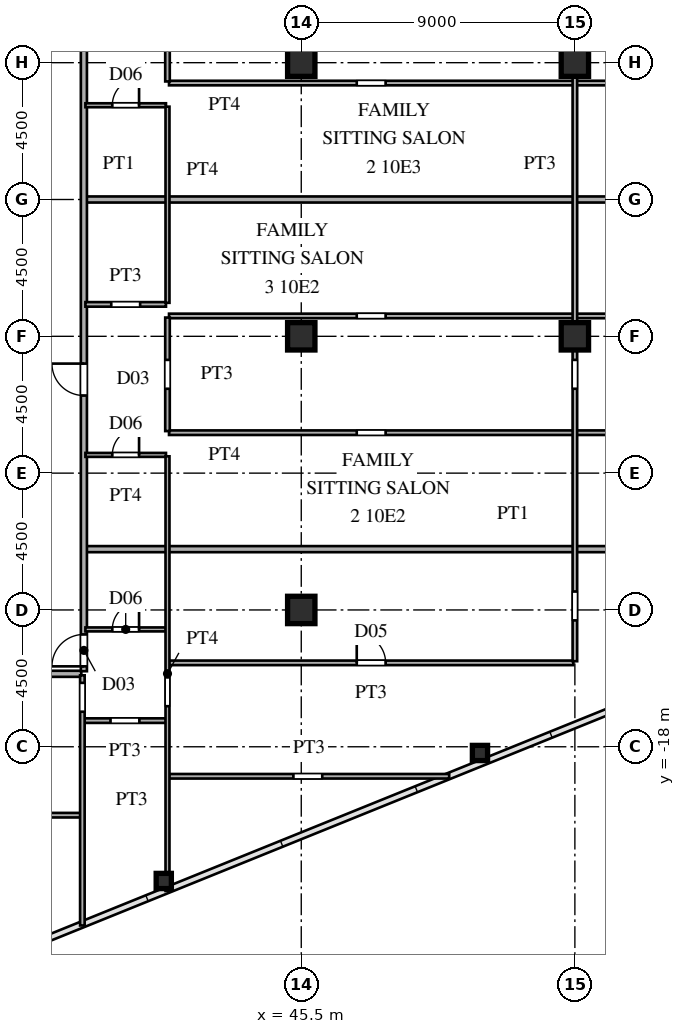
"""IFC4 building model, lengths in metres.
Left out: names, types, materials, properties, quantities, classifications, styles, units other than length and angle.
Written with IfcOpenShell. Run it as: python <this file> out.ifc"""

import sys

from ifc_helpers import new_model, si_unit, direction, frame, frame_2d, origin, origin_2d, place, context, subcontext, project, spatial, rectangle, hollow_rectangle, i_section, extrude, source, transform, mapped, element, fill, save


model = new_model("IFC4")
c1 = context("Model", 3, precision=1e-05, world=origin(), true_north=direction((0.0, 1.0)))
c2 = subcontext(c1, "Body", "Model", "MODEL_VIEW")
j1 = project(units=[si_unit("LENGTHUNIT", "METRE"), si_unit("PLANEANGLEUNIT", "RADIAN")], contexts=[c1])
p1 = place(None, origin())
s1 = spatial("IfcSite", under=j1, at=p1, CompositionType="ELEMENT")
p2 = place(p1, origin())
s2 = spatial("IfcBuilding", under=s1, at=p2, CompositionType="ELEMENT")
p3 = place(p2, frame((0.0, 0.0, 40.5)))
s3 = spatial("IfcBuildingStorey", under=s2, at=p3, CompositionType="ELEMENT", Elevation=40.5)
m1 = source(origin(), c2, "Body", "SweptSolid", [
    extrude(i_section(OverallWidth=0.9, OverallDepth=0.9, WebThickness=0.036, FlangeThickness=0.055, at=origin_2d()), origin(), (0.0, 0.0, 1.0), 3.6),
])
for number, where, z_axis, x_axis in (
    (1, (45.5, -13.5, 0.0), (0.0, 0.0, 1.0), (1.0, 0.0, 0.0)),
    (2, (45.5, -4.5, 0.0), (0.0, 0.0, 1.0), (1.0, 0.0, 0.0)),
    (3, (45.5, 4.5, 0.0), (0.0, 0.0, 1.0), (1.0, 0.0, 0.0)),
    (4, (54.5, -4.5, 0.0), (0.0, 0.0, 1.0), (1.0, 0.0, 0.0)),
    (5, (54.5, 4.5, 0.0), (0.0, 0.0, 1.0), (1.0, 0.0, 0.0)),
):
    element("IfcColumn", number, at=place(p3, frame(where, z_axis=z_axis, x_axis=x_axis)), inside=s3, PredefinedType="COLUMN", context=c2, shape_type="MappedRepresentation", body=[
        mapped(m1, transform((0.0, 0.0, 0.0), scale=1.0)),
    ])
m2 = source(origin(), c2, "Body", "SweptSolid", [
    extrude(hollow_rectangle(XDim=0.5, YDim=0.5, WallThickness=0.02, at=origin_2d()), origin(), (0.0, 0.0, 1.0), 3.6),
])
for number, where, z_axis, x_axis in (
    (6, (40.977, -22.414, 0.0), (0.0, 0.0, 1.0), (1.0, 0.0, 0.0)),
    (7, (51.378, -18.204, 0.0), (0.0, 0.0, 1.0), (1.0, 0.0, 0.0)),
):
    element("IfcColumn", number, at=place(p3, frame(where, z_axis=z_axis, x_axis=x_axis)), inside=s3, PredefinedType="COLUMN", context=c2, shape_type="MappedRepresentation", body=[
        mapped(m2, transform((0.0, 0.0, 0.0), scale=1.0)),
    ])
p4 = place(p3, frame((27.465, -20.25, 0.0), z_axis=(0.0, 0.0, 1.0), x_axis=(1.0, 0.0, 0.0)))
e8 = element("IfcWall", 8, at=p4, inside=s3, PredefinedType="PARTITIONING", context=c2, shape_type="SweptSolid", body=[
    extrude(rectangle(XDim=10.785, YDim=0.15, at=frame_2d((5.393, 0.0))), origin(), (0.0, 0.0, 1.0), 3.38),
])
p5 = place(p4, frame((4.96, 0.0, 0.0)))
e9 = element("IfcOpeningElement", 9, at=p5, cuts=e8, PredefinedType="OPENING", context=c2, shape_type="SweptSolid", body=[
    extrude(rectangle(XDim=0.95, YDim=2.15, at=frame_2d((0.475, 1.075))), frame((0.0, 0.085, 0.0), z_axis=(0.0, -1.0, 0.0), x_axis=(1.0, 0.0, 0.0)), (0.0, 0.0, 1.0), 0.17),
])
p6 = place(p3, frame((41.15, -18.97, 0.0), z_axis=(0.0, 0.0, 1.0), x_axis=(1.0, 0.0, 0.0)))
e10 = element("IfcWall", 10, at=p6, inside=s3, PredefinedType="PARTITIONING", context=c2, shape_type="SweptSolid", body=[
    extrude(rectangle(XDim=9.216, YDim=0.15, at=frame_2d((4.608, 0.0))), origin(), (0.0, 0.0, 1.0), 3.38),
])
p7 = place(p6, frame((4.091, 0.0, 0.0)))
e11 = element("IfcOpeningElement", 11, at=p7, cuts=e10, PredefinedType="OPENING", context=c2, shape_type="SweptSolid", body=[
    extrude(rectangle(XDim=0.95, YDim=2.15, at=frame_2d((0.475, 1.075))), frame((0.0, 0.085, 0.0), z_axis=(0.0, -1.0, 0.0), x_axis=(1.0, 0.0, 0.0)), (0.0, 0.0, 1.0), 0.17),
])
p8 = place(p3, frame((38.35, -17.14, 0.0), z_axis=(0.0, 0.0, 1.0), x_axis=(1.0, 0.0, 0.0)))
e12 = element("IfcWall", 12, at=p8, inside=s3, PredefinedType="PARTITIONING", context=c2, shape_type="SweptSolid", body=[
    extrude(rectangle(XDim=2.7, YDim=0.15, at=frame_2d((1.35, 0.0))), origin(), (0.0, 0.0, 1.0), 3.38),
])
p9 = place(p8, frame((0.875, 0.0, 0.0)))
e13 = element("IfcOpeningElement", 13, at=p9, cuts=e12, PredefinedType="OPENING", context=c2, shape_type="SweptSolid", body=[
    extrude(rectangle(XDim=0.95, YDim=2.15, at=frame_2d((0.475, 1.075))), frame((0.0, 0.085, 0.0), z_axis=(0.0, -1.0, 0.0), x_axis=(1.0, 0.0, 0.0)), (0.0, 0.0, 1.0), 0.17),
])
p10 = place(p3, frame((36.585, -15.6, 0.0), z_axis=(0.0, 0.0, 1.0), x_axis=(1.0, 0.0, 0.0)))
e14 = element("IfcWall", 14, at=p10, inside=s3, PredefinedType="PARTITIONING", context=c2, shape_type="SweptSolid", body=[
    extrude(rectangle(XDim=1.68, YDim=0.2, at=frame_2d((0.84, 0.0))), origin(), (0.0, 0.0, 1.0), 3.38),
])
p11 = place(p3, frame((41.15, -15.24, 0.0), z_axis=(0.0, 0.0, 1.0), x_axis=(1.0, 0.0, 0.0)))
e15 = element("IfcWall", 15, at=p11, inside=s3, PredefinedType="PARTITIONING", context=c2, shape_type="SweptSolid", body=[
    extrude(rectangle(XDim=13.3, YDim=0.15, at=frame_2d((6.65, 0.0))), origin(), (0.0, 0.0, 1.0), 3.38),
])
p12 = place(p11, frame((6.175, 0.0, 0.0)))
e16 = element("IfcOpeningElement", 16, at=p12, cuts=e15, PredefinedType="OPENING", context=c2, shape_type="SweptSolid", body=[
    extrude(rectangle(XDim=0.95, YDim=2.15, at=frame_2d((0.475, 1.075))), frame((0.0, 0.085, 0.0), z_axis=(0.0, -1.0, 0.0), x_axis=(1.0, 0.0, 0.0)), (0.0, 0.0, 1.0), 0.17),
])
p13 = place(p3, frame((38.4, -14.14, 0.0), z_axis=(0.0, 0.0, 1.0), x_axis=(1.0, 0.0, 0.0)))
e17 = element("IfcWall", 17, at=p13, inside=s3, PredefinedType="PARTITIONING", context=c2, shape_type="SweptSolid", body=[
    extrude(rectangle(XDim=2.65, YDim=0.13, at=frame_2d((1.325, 0.0))), origin(), (0.0, 0.0, 1.0), 3.38),
])
p14 = place(p13, frame((0.885, 0.0, 0.0)))
e18 = element("IfcOpeningElement", 18, at=p14, cuts=e17, PredefinedType="OPENING", context=c2, shape_type="SweptSolid", body=[
    extrude(rectangle(XDim=0.88, YDim=2.1, at=frame_2d((0.44, 1.05))), frame((0.0, 0.075, 0.0), z_axis=(0.0, -1.0, 0.0), x_axis=(1.0, 0.0, 0.0)), (0.0, 0.0, 1.0), 0.15),
])
p15 = place(p3, frame((38.43, -11.5, 0.0), z_axis=(0.0, 0.0, 1.0), x_axis=(1.0, 0.0, 0.0)))
e19 = element("IfcWall", 19, at=p15, inside=s3, PredefinedType="PARTITIONING", context=c2, shape_type="SweptSolid", body=[
    extrude(rectangle(XDim=30.377, YDim=0.2, at=frame_2d((15.188, 0.0))), origin(), (0.0, 0.0, 1.0), 3.38),
])
p16 = place(p3, frame((38.4, -8.4, 0.0), z_axis=(0.0, 0.0, 1.0), x_axis=(1.0, 0.0, 0.0)))
e20 = element("IfcWall", 20, at=p16, inside=s3, PredefinedType="PARTITIONING", context=c2, shape_type="SweptSolid", body=[
    extrude(rectangle(XDim=2.65, YDim=0.13, at=frame_2d((1.325, 0.0))), origin(), (0.0, 0.0, 1.0), 3.38),
])
p17 = place(p16, frame((0.885, 0.0, 0.0)))
e21 = element("IfcOpeningElement", 21, at=p17, cuts=e20, PredefinedType="OPENING", context=c2, shape_type="SweptSolid", body=[
    extrude(rectangle(XDim=0.88, YDim=2.1, at=frame_2d((0.44, 1.05))), frame((0.0, 0.075, 0.0), z_axis=(0.0, -1.0, 0.0), x_axis=(1.0, 0.0, 0.0)), (0.0, 0.0, 1.0), 0.15),
])
p18 = place(p3, frame((41.15, -7.67, 0.0), z_axis=(0.0, 0.0, 1.0), x_axis=(1.0, 0.0, 0.0)))
e22 = element("IfcWall", 22, at=p18, inside=s3, PredefinedType="PARTITIONING", context=c2, shape_type="SweptSolid", body=[
    extrude(rectangle(XDim=31.385, YDim=0.15, at=frame_2d((15.692, 0.0))), origin(), (0.0, 0.0, 1.0), 3.38),
])
p19 = place(p18, frame((6.175, 0.0, 0.0)))
e23 = element("IfcOpeningElement", 23, at=p19, cuts=e22, PredefinedType="OPENING", context=c2, shape_type="SweptSolid", body=[
    extrude(rectangle(XDim=0.95, YDim=2.15, at=frame_2d((0.475, 1.075))), frame((0.0, 0.085, 0.0), z_axis=(0.0, -1.0, 0.0), x_axis=(1.0, 0.0, 0.0)), (0.0, 0.0, 1.0), 0.17),
])
p20 = place(p18, frame((15.725, 0.0, 0.0)))
e24 = element("IfcOpeningElement", 24, at=p20, cuts=e22, PredefinedType="OPENING", context=c2, shape_type="SweptSolid", body=[
    extrude(rectangle(XDim=0.95, YDim=2.15, at=frame_2d((0.475, 1.075))), frame((0.0, 0.085, 0.0), z_axis=(0.0, -1.0, 0.0), x_axis=(1.0, 0.0, 0.0)), (0.0, 0.0, 1.0), 0.17),
])
p21 = place(p3, frame((41.15, -3.83, 0.0), z_axis=(0.0, 0.0, 1.0), x_axis=(1.0, 0.0, 0.0)))
e25 = element("IfcWall", 25, at=p21, inside=s3, PredefinedType="PARTITIONING", context=c2, shape_type="SweptSolid", body=[
    extrude(rectangle(XDim=31.385, YDim=0.15, at=frame_2d((15.692, 0.0))), origin(), (0.0, 0.0, 1.0), 3.38),
])
p22 = place(p21, frame((6.175, 0.0, 0.0)))
e26 = element("IfcOpeningElement", 26, at=p22, cuts=e25, PredefinedType="OPENING", context=c2, shape_type="SweptSolid", body=[
    extrude(rectangle(XDim=0.95, YDim=2.15, at=frame_2d((0.475, 1.075))), frame((0.0, 0.085, 0.0), z_axis=(0.0, -1.0, 0.0), x_axis=(1.0, 0.0, 0.0)), (0.0, 0.0, 1.0), 0.17),
])
p23 = place(p21, frame((15.725, 0.0, 0.0)))
e27 = element("IfcOpeningElement", 27, at=p23, cuts=e25, PredefinedType="OPENING", context=c2, shape_type="SweptSolid", body=[
    extrude(rectangle(XDim=0.95, YDim=2.15, at=frame_2d((0.475, 1.075))), frame((0.0, 0.085, 0.0), z_axis=(0.0, -1.0, 0.0), x_axis=(1.0, 0.0, 0.0)), (0.0, 0.0, 1.0), 0.17),
])
p24 = place(p3, frame((38.4, -3.45, 0.0), z_axis=(0.0, 0.0, 1.0), x_axis=(1.0, 0.0, 0.0)))
e28 = element("IfcWall", 28, at=p24, inside=s3, PredefinedType="PARTITIONING", context=c2, shape_type="SweptSolid", body=[
    extrude(rectangle(XDim=2.65, YDim=0.15, at=frame_2d((1.325, 0.0))), origin(), (0.0, 0.0, 1.0), 3.38),
])
p25 = place(p24, frame((0.85, 0.0, 0.0)))
e29 = element("IfcOpeningElement", 29, at=p25, cuts=e28, PredefinedType="OPENING", context=c2, shape_type="SweptSolid", body=[
    extrude(rectangle(XDim=0.95, YDim=2.15, at=frame_2d((0.475, 1.075))), frame((0.0, 0.085, 0.0), z_axis=(0.0, -1.0, 0.0), x_axis=(1.0, 0.0, 0.0)), (0.0, 0.0, 1.0), 0.17),
])
p26 = place(p3, frame((38.43, 0.0, 0.0), z_axis=(0.0, 0.0, 1.0), x_axis=(1.0, 0.0, 0.0)))
e30 = element("IfcWall", 30, at=p26, inside=s3, PredefinedType="PARTITIONING", context=c2, shape_type="SweptSolid", body=[
    extrude(rectangle(XDim=25.05, YDim=0.2, at=frame_2d((12.525, 0.0))), origin(), (0.0, 0.0, 1.0), 3.38),
])
p27 = place(p3, frame((38.4, 3.1, 0.0), z_axis=(0.0, 0.0, 1.0), x_axis=(1.0, 0.0, 0.0)))
e31 = element("IfcWall", 31, at=p27, inside=s3, PredefinedType="PARTITIONING", context=c2, shape_type="SweptSolid", body=[
    extrude(rectangle(XDim=2.65, YDim=0.13, at=frame_2d((1.325, 0.0))), origin(), (0.0, 0.0, 1.0), 3.38),
])
p28 = place(p27, frame((0.885, 0.0, 0.0)))
e32 = element("IfcOpeningElement", 32, at=p28, cuts=e31, PredefinedType="OPENING", context=c2, shape_type="SweptSolid", body=[
    extrude(rectangle(XDim=0.88, YDim=2.1, at=frame_2d((0.44, 1.05))), frame((0.0, 0.075, 0.0), z_axis=(0.0, -1.0, 0.0), x_axis=(1.0, 0.0, 0.0)), (0.0, 0.0, 1.0), 0.15),
])
p29 = place(p3, frame((41.15, 3.83, 0.0), z_axis=(0.0, 0.0, 1.0), x_axis=(1.0, 0.0, 0.0)))
e33 = element("IfcWall", 33, at=p29, inside=s3, PredefinedType="PARTITIONING", context=c2, shape_type="SweptSolid", body=[
    extrude(rectangle(XDim=31.385, YDim=0.15, at=frame_2d((15.692, 0.0))), origin(), (0.0, 0.0, 1.0), 3.38),
])
p30 = place(p29, frame((6.175, 0.0, 0.0)))
e34 = element("IfcOpeningElement", 34, at=p30, cuts=e33, PredefinedType="OPENING", context=c2, shape_type="SweptSolid", body=[
    extrude(rectangle(XDim=0.95, YDim=2.15, at=frame_2d((0.475, 1.075))), frame((0.0, 0.085, 0.0), z_axis=(0.0, -1.0, 0.0), x_axis=(1.0, 0.0, 0.0)), (0.0, 0.0, 1.0), 0.17),
])
p31 = place(p29, frame((15.725, 0.0, 0.0)))
e35 = element("IfcOpeningElement", 35, at=p31, cuts=e33, PredefinedType="OPENING", context=c2, shape_type="SweptSolid", body=[
    extrude(rectangle(XDim=0.95, YDim=2.15, at=frame_2d((0.475, 1.075))), frame((0.0, 0.085, 0.0), z_axis=(0.0, -1.0, 0.0), x_axis=(1.0, 0.0, 0.0)), (0.0, 0.0, 1.0), 0.17),
])
p32 = place(p3, frame((38.3, -23.878, 0.0), z_axis=(0.0, 0.0, 1.0), x_axis=(0.0, 1.0, 0.0)))
e36 = element("IfcWall", 36, at=p32, inside=s3, PredefinedType="PARTITIONING", context=c2, shape_type="SweptSolid", body=[
    extrude(rectangle(XDim=8.228, YDim=0.15, at=frame_2d((4.114, 0.0))), origin(), (0.0, 0.0, 1.0), 3.38),
])
p33 = place(p32, frame((7.031, 0.0, 0.0)))
e37 = element("IfcOpeningElement", 37, at=p33, cuts=e36, PredefinedType="OPENING", context=c2, shape_type="SweptSolid", body=[
    extrude(rectangle(XDim=0.95, YDim=2.15, at=frame_2d((0.475, 1.075))), frame((0.0, 0.085, 0.0), z_axis=(0.0, -1.0, 0.0), x_axis=(1.0, 0.0, 0.0)), (0.0, 0.0, 1.0), 0.17),
])
p34 = place(p3, frame((38.35, -15.515, 0.0), z_axis=(0.0, 0.0, 1.0), x_axis=(0.0, 1.0, 0.0)))
e38 = element("IfcWall", 38, at=p34, inside=s3, PredefinedType="PARTITIONING", context=c2, shape_type="SweptSolid", body=[
    extrude(rectangle(XDim=31.03, YDim=0.2, at=frame_2d((15.515, 0.0))), origin(), (0.0, 0.0, 1.0), 3.38),
])
p35 = place(p34, frame((0.16, 0.0, 0.0)))
e39 = element("IfcOpeningElement", 39, at=p35, cuts=e38, PredefinedType="OPENING", context=c2, shape_type="SweptSolid", body=[
    extrude(rectangle(XDim=1.05, YDim=2.25, at=frame_2d((0.525, 1.125))), frame((0.0, 0.11, 0.0), z_axis=(0.0, -1.0, 0.0), x_axis=(1.0, 0.0, 0.0)), (0.0, 0.0, 1.0), 0.22),
])
p36 = place(p34, frame((9.067, 0.0, 0.0)))
e40 = element("IfcOpeningElement", 40, at=p36, cuts=e38, PredefinedType="OPENING", context=c2, shape_type="SweptSolid", body=[
    extrude(rectangle(XDim=1.05, YDim=2.25, at=frame_2d((0.525, 1.125))), frame((0.0, 0.11, 0.0), z_axis=(0.0, -1.0, 0.0), x_axis=(1.0, 0.0, 0.0)), (0.0, 0.0, 1.0), 0.22),
])
p37 = place(p34, frame((20.567, 0.0, 0.0)))
e41 = element("IfcOpeningElement", 41, at=p37, cuts=e38, PredefinedType="OPENING", context=c2, shape_type="SweptSolid", body=[
    extrude(rectangle(XDim=1.05, YDim=2.25, at=frame_2d((0.525, 1.125))), frame((0.0, 0.11, 0.0), z_axis=(0.0, -1.0, 0.0), x_axis=(1.0, 0.0, 0.0)), (0.0, 0.0, 1.0), 0.22),
])
p38 = place(p34, frame((29.82, 0.0, 0.0)))
e42 = element("IfcOpeningElement", 42, at=p38, cuts=e38, PredefinedType="OPENING", context=c2, shape_type="SweptSolid", body=[
    extrude(rectangle(XDim=1.05, YDim=2.25, at=frame_2d((0.525, 1.125))), frame((0.0, 0.11, 0.0), z_axis=(0.0, -1.0, 0.0), x_axis=(1.0, 0.0, 0.0)), (0.0, 0.0, 1.0), 0.22),
])
p39 = place(p3, frame((41.1, -22.744, 0.0), z_axis=(0.0, 0.0, 1.0), x_axis=(0.0, 1.0, 0.0)))
e43 = element("IfcWall", 43, at=p39, inside=s3, PredefinedType="PARTITIONING", context=c2, shape_type="SweptSolid", body=[
    extrude(rectangle(XDim=14.297, YDim=0.13, at=frame_2d((7.148, 0.0))), origin(), (0.0, 0.0, 1.0), 3.38),
])
p40 = place(p39, frame((6.078, 0.0, 0.0)))
e44 = element("IfcOpeningElement", 44, at=p40, cuts=e43, PredefinedType="OPENING", context=c2, shape_type="SweptSolid", body=[
    extrude(rectangle(XDim=0.95, YDim=2.15, at=frame_2d((0.475, 1.075))), frame((0.0, 0.075, 0.0), z_axis=(0.0, -1.0, 0.0), x_axis=(1.0, 0.0, 0.0)), (0.0, 0.0, 1.0), 0.15),
])
p41 = place(p3, frame((41.1, -7.617, 0.0), z_axis=(0.0, 0.0, 1.0), x_axis=(0.0, 1.0, 0.0)))
e45 = element("IfcWall", 45, at=p41, inside=s3, PredefinedType="PARTITIONING", context=c2, shape_type="SweptSolid", body=[
    extrude(rectangle(XDim=3.734, YDim=0.15, at=frame_2d((1.867, 0.0))), origin(), (0.0, 0.0, 1.0), 2.99),
])
p42 = place(p41, frame((1.392, 0.0, 0.0)))
e46 = element("IfcOpeningElement", 46, at=p42, cuts=e45, PredefinedType="OPENING", context=c2, shape_type="SweptSolid", body=[
    extrude(rectangle(XDim=0.95, YDim=2.15, at=frame_2d((0.475, 1.075))), frame((0.0, 0.085, 0.0), z_axis=(0.0, -1.0, 0.0), x_axis=(1.0, 0.0, 0.0)), (0.0, 0.0, 1.0), 0.17),
])
p43 = place(p3, frame((41.1, -3.398, 0.0), z_axis=(0.0, 0.0, 1.0), x_axis=(0.0, 1.0, 0.0)))
e47 = element("IfcWall", 47, at=p43, inside=s3, PredefinedType="PARTITIONING", context=c2, shape_type="SweptSolid", body=[
    extrude(rectangle(XDim=6.451, YDim=0.13, at=frame_2d((3.226, 0.0))), origin(), (0.0, 0.0, 1.0), 3.38),
])
p44 = place(p3, frame((41.1, 3.883, 0.0), z_axis=(0.0, 0.0, 1.0), x_axis=(0.0, 1.0, 0.0)))
e48 = element("IfcWall", 48, at=p44, inside=s3, PredefinedType="PARTITIONING", context=c2, shape_type="SweptSolid", body=[
    extrude(rectangle(XDim=3.734, YDim=0.15, at=frame_2d((1.867, 0.0))), origin(), (0.0, 0.0, 1.0), 2.99),
])
p45 = place(p44, frame((1.392, 0.0, 0.0)))
e49 = element("IfcOpeningElement", 49, at=p45, cuts=e48, PredefinedType="OPENING", context=c2, shape_type="SweptSolid", body=[
    extrude(rectangle(XDim=0.95, YDim=2.15, at=frame_2d((0.475, 1.075))), frame((0.0, 0.085, 0.0), z_axis=(0.0, -1.0, 0.0), x_axis=(1.0, 0.0, 0.0)), (0.0, 0.0, 1.0), 0.17),
])
p46 = place(p3, frame((54.5, -15.186, 0.0), z_axis=(0.0, 0.0, 1.0), x_axis=(0.0, 1.0, 0.0)))
e50 = element("IfcWall", 50, at=p46, inside=s3, PredefinedType="PARTITIONING", context=c2, shape_type="SweptSolid", body=[
    extrude(rectangle(XDim=30.372, YDim=0.15, at=frame_2d((15.186, 0.0))), origin(), (0.0, 0.0, 1.0), 2.68),
])
p47 = place(p46, frame((1.343, 0.0, 0.0)))
e51 = element("IfcOpeningElement", 51, at=p47, cuts=e50, PredefinedType="OPENING", context=c2, shape_type="SweptSolid", body=[
    extrude(rectangle(XDim=0.95, YDim=2.15, at=frame_2d((0.475, 1.075))), frame((0.0, 0.085, 0.0), z_axis=(0.0, -1.0, 0.0), x_axis=(1.0, 0.0, 0.0)), (0.0, 0.0, 1.0), 0.17),
])
p48 = place(p46, frame((8.961, 0.0, 0.0)))
e52 = element("IfcOpeningElement", 52, at=p48, cuts=e50, PredefinedType="OPENING", context=c2, shape_type="SweptSolid", body=[
    extrude(rectangle(XDim=0.95, YDim=2.15, at=frame_2d((0.475, 1.075))), frame((0.0, 0.085, 0.0), z_axis=(0.0, -1.0, 0.0), x_axis=(1.0, 0.0, 0.0)), (0.0, 0.0, 1.0), 0.17),
])
p49 = place(p46, frame((20.461, 0.0, 0.0)))
e53 = element("IfcOpeningElement", 53, at=p49, cuts=e50, PredefinedType="OPENING", context=c2, shape_type="SweptSolid", body=[
    extrude(rectangle(XDim=0.95, YDim=2.15, at=frame_2d((0.475, 1.075))), frame((0.0, 0.085, 0.0), z_axis=(0.0, -1.0, 0.0), x_axis=(1.0, 0.0, 0.0)), (0.0, 0.0, 1.0), 0.17),
])
p50 = place(p46, frame((28.079, 0.0, 0.0)))
e54 = element("IfcOpeningElement", 54, at=p50, cuts=e50, PredefinedType="OPENING", context=c2, shape_type="SweptSolid", body=[
    extrude(rectangle(XDim=0.95, YDim=2.15, at=frame_2d((0.475, 1.075))), frame((0.0, 0.085, 0.0), z_axis=(0.0, -1.0, 0.0), x_axis=(1.0, 0.0, 0.0)), (0.0, 0.0, 1.0), 0.17),
])
m3 = source(origin(), c2, "Body", "SweptSolid", [
    extrude(rectangle(XDim=0.95, YDim=2.15, at=frame_2d((0.475, 1.075))), frame((0.0, 0.025, 0.0), z_axis=(0.0, -1.0, 0.0), x_axis=(1.0, 0.0, 0.0)), (0.0, 0.0, 1.0), 0.05),
])
p51 = place(p12, origin())
e55 = element("IfcDoor", 55, at=p51, inside=s3, OperationType="SINGLE_SWING_LEFT", PredefinedType="DOOR", context=c2, shape_type="MappedRepresentation", body=[
    mapped(m3, transform((0.0, 0.0, 0.0), scale=1.0)),
])
fill(e16, e55)
m4 = source(origin(), c2, "Body", "SweptSolid", [
    extrude(rectangle(XDim=0.88, YDim=2.1, at=frame_2d((0.44, 1.05))), frame((0.0, 0.025, 0.0), z_axis=(0.0, -1.0, 0.0), x_axis=(1.0, 0.0, 0.0)), (0.0, 0.0, 1.0), 0.05),
])
p52 = place(p14, origin())
e56 = element("IfcDoor", 56, at=p52, inside=s3, OperationType="SINGLE_SWING_RIGHT", PredefinedType="DOOR", context=c2, shape_type="MappedRepresentation", body=[
    mapped(m4, transform((0.0, 0.0, 0.0), scale=1.0)),
])
fill(e18, e56)
p53 = place(p17, origin())
e57 = element("IfcDoor", 57, at=p53, inside=s3, OperationType="SINGLE_SWING_RIGHT", PredefinedType="DOOR", context=c2, shape_type="MappedRepresentation", body=[
    mapped(m4, transform((0.0, 0.0, 0.0), scale=1.0)),
])
fill(e21, e57)
p54 = place(p28, origin())
e58 = element("IfcDoor", 58, at=p54, inside=s3, OperationType="SINGLE_SWING_RIGHT", PredefinedType="DOOR", context=c2, shape_type="MappedRepresentation", body=[
    mapped(m4, transform((0.0, 0.0, 0.0), scale=1.0)),
])
fill(e32, e58)
m5 = source(origin(), c2, "Body", "SweptSolid", [
    extrude(rectangle(XDim=1.05, YDim=2.25, at=frame_2d((0.525, 1.125))), frame((0.0, 0.025, 0.0), z_axis=(0.0, -1.0, 0.0), x_axis=(1.0, 0.0, 0.0)), (0.0, 0.0, 1.0), 0.05),
])
p55 = place(p35, origin())
e59 = element("IfcDoor", 59, at=p55, inside=s3, OperationType="SINGLE_SWING_LEFT", PredefinedType="DOOR", context=c2, shape_type="MappedRepresentation", body=[
    mapped(m5, transform((0.0, 0.0, 0.0), scale=1.0)),
])
fill(e39, e59)
p56 = place(p36, origin())
e60 = element("IfcDoor", 60, at=p56, inside=s3, OperationType="SINGLE_SWING_RIGHT", PredefinedType="DOOR", context=c2, shape_type="MappedRepresentation", body=[
    mapped(m5, transform((0.0, 0.0, 0.0), scale=1.0)),
])
fill(e40, e60)
save(model, sys.argv[1])
